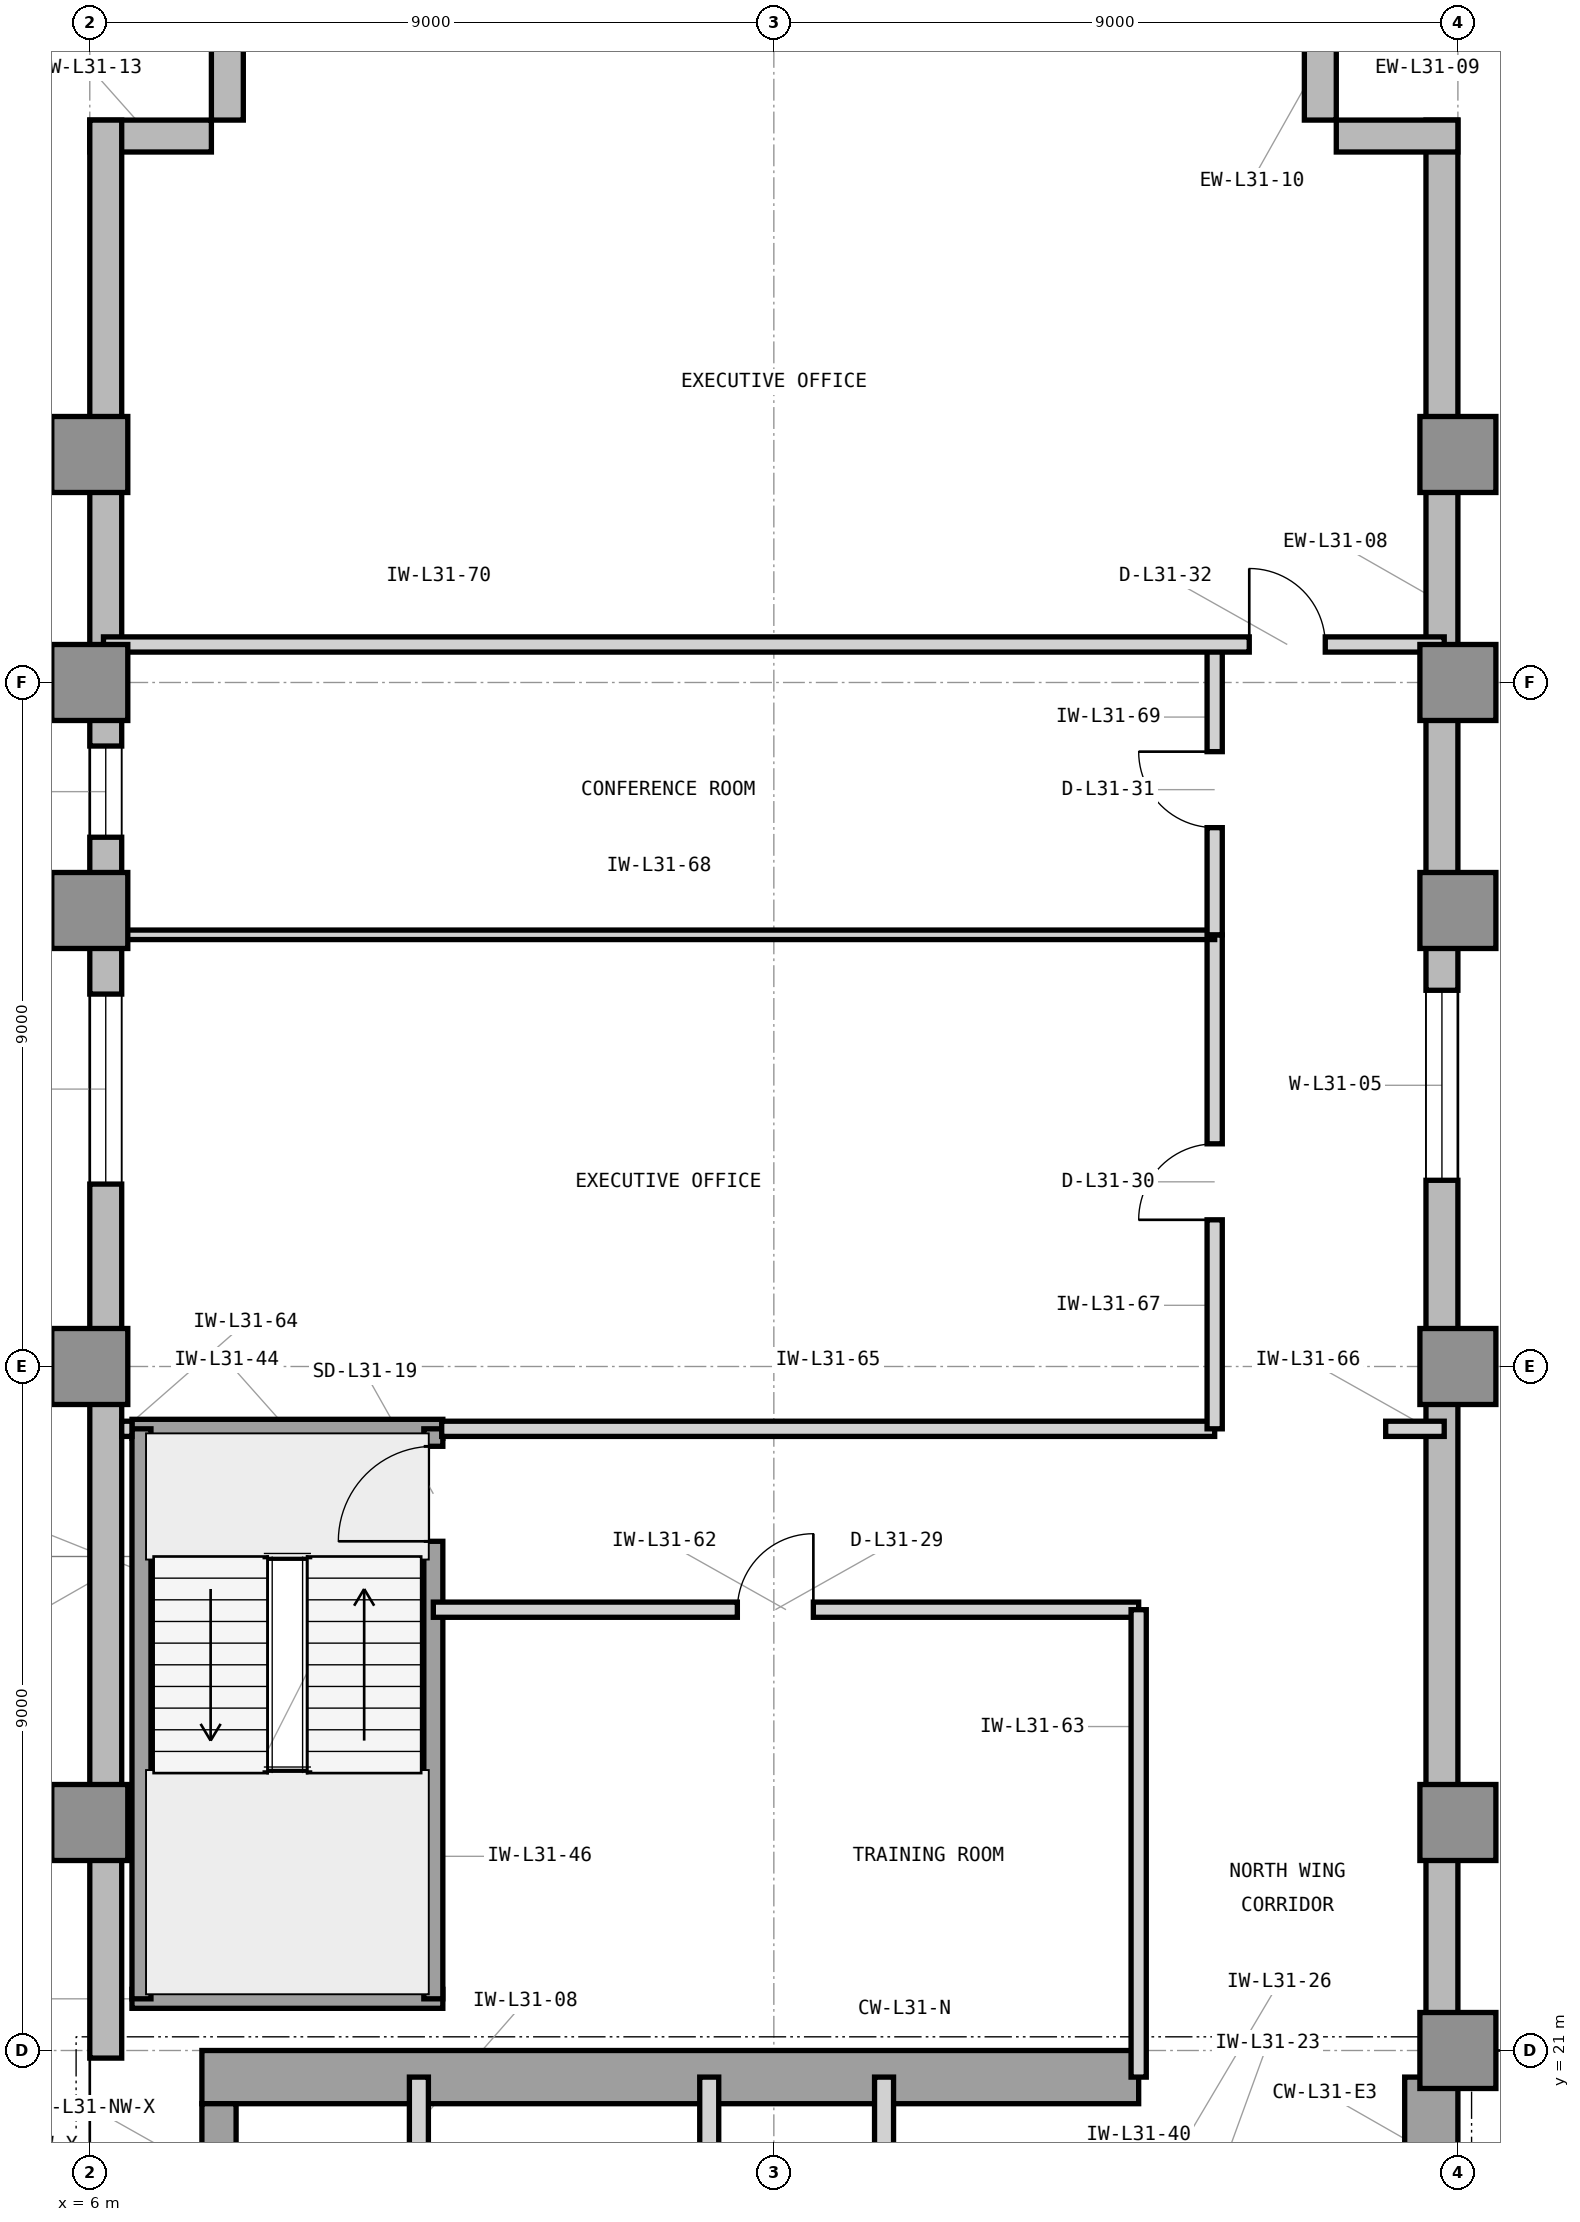
"""IFC4 building model, lengths in metres.
Left out: names, types, materials, properties, quantities, classifications, styles, units other than length and angle.
Written with IfcOpenShell. Run it as: python <this file> out.ifc"""

import sys

from ifc_helpers import new_model, si_unit, direction, frame, frame_2d, origin, origin_2d, place, context, subcontext, project, spatial, rectangle, extrude, element, fill, save


model = new_model("IFC4")
c1 = context("Model", 3, precision=1e-05, world=origin(), true_north=direction((0.0, 1.0)))
c2 = subcontext(c1, "Body", "Model", "MODEL_VIEW")
j1 = project(units=[si_unit("LENGTHUNIT", "METRE"), si_unit("PLANEANGLEUNIT", "RADIAN")], contexts=[c1])
p1 = place(None, origin())
s1 = spatial("IfcSite", under=j1, at=p1, CompositionType="ELEMENT")
p2 = place(p1, origin())
s2 = spatial("IfcBuilding", under=s1, at=p2, CompositionType="ELEMENT")
p3 = place(p2, frame((0.0, 0.0, 132.3)))
s3 = spatial("IfcBuildingStorey", under=s2, at=p3, CompositionType="ELEMENT", Elevation=132.3)
p4 = place(p3, frame((7.475, 20.65, 0.0), z_axis=(0.0, 0.0, 1.0), x_axis=(1.0, 0.0, 0.0)))
e1 = element("IfcWall", 1, at=p4, inside=s3, PredefinedType="SHEAR", context=c2, shape_type="SweptSolid", body=[
    extrude(rectangle(XDim=12.325, YDim=0.7, at=frame_2d((6.163, 0.0))), origin(), (0.0, 0.0, 1.0), 3.9),
])
p5 = place(p3, frame((23.65, 16.6, 0.0), z_axis=(0.0, 0.0, 1.0), x_axis=(0.0, 1.0, 0.0)))
e2 = element("IfcWall", 2, at=p5, inside=s3, PredefinedType="SHEAR", context=c2, shape_type="SweptSolid", body=[
    extrude(rectangle(XDim=4.05, YDim=0.7, at=frame_2d((2.025, 0.0))), origin(), (0.0, 0.0, 1.0), 3.9),
])
p6 = place(p3, frame((7.7, 19.575, 0.0), z_axis=(0.0, 0.0, 1.0), x_axis=(0.0, 1.0, 0.0)))
e3 = element("IfcWall", 3, at=p6, inside=s3, PredefinedType="SHEAR", context=c2, shape_type="SweptSolid", body=[
    extrude(rectangle(XDim=0.725, YDim=0.45, at=frame_2d((0.363, 0.0))), origin(), (0.0, 0.0, 1.0), 3.9),
])
for number, where, z_axis, x_axis in (
    (4, (24.0, 21.0, 0.0), (0.0, 0.0, 1.0), (1.0, 0.0, 0.0)),
    (5, (6.0, 24.0, 0.0), (0.0, 0.0, 1.0), (1.0, 0.0, 0.0)),
    (6, (24.0, 24.0, 0.0), (0.0, 0.0, 1.0), (1.0, 0.0, 0.0)),
    (7, (6.0, 30.0, 0.0), (0.0, 0.0, 1.0), (1.0, 0.0, 0.0)),
    (8, (24.0, 30.0, 0.0), (0.0, 0.0, 1.0), (1.0, 0.0, 0.0)),
    (9, (6.0, 36.0, 0.0), (0.0, 0.0, 1.0), (1.0, 0.0, 0.0)),
    (10, (24.0, 36.0, 0.0), (0.0, 0.0, 1.0), (1.0, 0.0, 0.0)),
    (11, (6.0, 39.0, 0.0), (0.0, 0.0, 1.0), (1.0, 0.0, 0.0)),
    (12, (24.0, 39.0, 0.0), (0.0, 0.0, 1.0), (1.0, 0.0, 0.0)),
    (13, (6.0, 42.0, 0.0), (0.0, 0.0, 1.0), (1.0, 0.0, 0.0)),
    (14, (24.0, 42.0, 0.0), (0.0, 0.0, 1.0), (1.0, 0.0, 0.0)),
):
    element("IfcColumn", number, at=place(p3, frame(where, z_axis=z_axis, x_axis=x_axis)), inside=s3, PredefinedType="COLUMN", context=c2, shape_type="SweptSolid", body=[
        extrude(rectangle(XDim=1.0, YDim=1.0, at=origin_2d()), origin(), (0.0, 0.0, 1.0), 3.9),
    ])
p7 = place(p3, frame((23.79, 21.0, 0.0), z_axis=(0.0, 0.0, 1.0), x_axis=(0.0, 1.0, 0.0)))
e15 = element("IfcWall", 15, at=p7, inside=s3, PredefinedType="STANDARD", context=c2, shape_type="SweptSolid", body=[
    extrude(rectangle(XDim=25.4, YDim=0.42, at=frame_2d((12.7, 0.0))), origin(), (0.0, 0.0, 1.0), 3.7),
])
p8 = place(p7, frame((11.45, 0.0, 0.85)))
e16 = element("IfcOpeningElement", 16, at=p8, cuts=e15, PredefinedType="OPENING", context=c2, shape_type="SweptSolid", body=[
    extrude(rectangle(XDim=2.5, YDim=2.25, at=frame_2d((1.25, 1.125))), frame((0.0, 0.22, 0.0), z_axis=(0.0, -1.0, 0.0), x_axis=(1.0, 0.0, 0.0)), (0.0, 0.0, 1.0), 0.44),
])
for number, where, z_axis, x_axis in (
    (17, (24.0, 46.19, 0.0), (0.0, 0.0, 1.0), (-1.0, 0.0, 0.0)),
    (18, (22.19, 46.4, 0.0), (0.0, 0.0, 1.0), (0.0, 1.0, 0.0)),
    (19, (7.81, 48.0, 0.0), (0.0, 0.0, 1.0), (0.0, -1.0, 0.0)),
    (20, (7.6, 46.19, 0.0), (0.0, 0.0, 1.0), (-1.0, 0.0, 0.0)),
):
    element("IfcWall", number, at=place(p3, frame(where, z_axis=z_axis, x_axis=x_axis)), inside=s3, PredefinedType="STANDARD", context=c2, shape_type="SweptSolid", body=[
        extrude(rectangle(XDim=1.6, YDim=0.42, at=frame_2d((0.8, 0.0))), origin(), (0.0, 0.0, 1.0), 3.7),
    ])
p9 = place(p3, frame((6.21, 46.4, 0.0), z_axis=(0.0, 0.0, 1.0), x_axis=(0.0, -1.0, 0.0)))
e21 = element("IfcWall", 21, at=p9, inside=s3, PredefinedType="STANDARD", context=c2, shape_type="SweptSolid", body=[
    extrude(rectangle(XDim=25.5, YDim=0.42, at=frame_2d((12.75, 0.0))), origin(), (0.0, 0.0, 1.0), 3.7),
])
p10 = place(p9, frame((11.5, 0.0, 0.85)))
e22 = element("IfcOpeningElement", 22, at=p10, cuts=e21, PredefinedType="OPENING", context=c2, shape_type="SweptSolid", body=[
    extrude(rectangle(XDim=2.5, YDim=2.25, at=frame_2d((1.25, 1.125))), frame((0.0, 0.22, 0.0), z_axis=(0.0, -1.0, 0.0), x_axis=(1.0, 0.0, 0.0)), (0.0, 0.0, 1.0), 0.44),
])
p11 = place(p9, frame((8.236, 0.0, 0.85)))
e23 = element("IfcOpeningElement", 23, at=p11, cuts=e21, PredefinedType="OPENING", context=c2, shape_type="SweptSolid", body=[
    extrude(rectangle(XDim=1.2, YDim=2.25, at=frame_2d((0.6, 1.125))), frame((0.0, 0.22, 0.0), z_axis=(0.0, -1.0, 0.0), x_axis=(1.0, 0.0, 0.0)), (0.0, 0.0, 1.0), 0.44),
])
p12 = place(p3, frame((10.33, 19.45, 0.0), z_axis=(0.0, 0.0, 1.0), x_axis=(0.0, 1.0, 0.0)))
e24 = element("IfcWall", 24, at=p12, inside=s3, PredefinedType="PARTITIONING", context=c2, shape_type="SweptSolid", body=[
    extrude(rectangle(XDim=1.2, YDim=0.25, at=frame_2d((0.6, 0.0))), origin(), (0.0, 0.0, 1.0), 2.994),
])
for number, where, z_axis, x_axis in (
    (25, (14.15, 16.7, 0.0), (0.0, 0.0, 1.0), (0.0, 1.0, 0.0)),
    (26, (16.45, 16.7, 0.0), (0.0, 0.0, 1.0), (0.0, 1.0, 0.0)),
):
    element("IfcWall", number, at=place(p3, frame(where, z_axis=z_axis, x_axis=x_axis)), inside=s3, PredefinedType="PARTITIONING", context=c2, shape_type="SweptSolid", body=[
        extrude(rectangle(XDim=3.95, YDim=0.25, at=frame_2d((1.975, 0.0))), origin(), (0.0, 0.0, 1.0), 3.69),
    ])
for number, where, z_axis, x_axis in (
    (27, (6.555, 21.68, 0.0), (0.0, 0.0, 1.0), (1.0, 0.0, 0.0)),
    (28, (6.555, 29.18, 0.0), (0.0, 0.0, 1.0), (1.0, 0.0, 0.0)),
):
    element("IfcWall", number, at=place(p3, frame(where, z_axis=z_axis, x_axis=x_axis)), inside=s3, PredefinedType="SHEAR", context=c2, shape_type="SweptSolid", body=[
        extrude(rectangle(XDim=4.09, YDim=0.25, at=frame_2d((2.045, 0.0))), origin(), (0.0, 0.0, 1.0), 3.9),
    ])
p13 = place(p3, frame((6.68, 21.68, 0.0), z_axis=(0.0, 0.0, 1.0), x_axis=(0.0, 1.0, 0.0)))
e29 = element("IfcWall", 29, at=p13, inside=s3, PredefinedType="SHEAR", context=c2, shape_type="SweptSolid", body=[
    extrude(rectangle(XDim=7.5, YDim=0.25, at=frame_2d((3.75, 0.0))), origin(), (0.0, 0.0, 1.0), 3.9),
])
p14 = place(p3, frame((10.52, 21.68, 0.0), z_axis=(0.0, 0.0, 1.0), x_axis=(0.0, 1.0, 0.0)))
e30 = element("IfcWall", 30, at=p14, inside=s3, PredefinedType="SHEAR", context=c2, shape_type="SweptSolid", body=[
    extrude(rectangle(XDim=7.5, YDim=0.25, at=frame_2d((3.75, 0.0))), origin(), (0.0, 0.0, 1.0), 3.9),
])
p15 = place(p14, frame((6.02, 0.0, 0.0)))
e31 = element("IfcOpeningElement", 31, at=p15, cuts=e30, PredefinedType="OPENING", context=c2, shape_type="SweptSolid", body=[
    extrude(rectangle(XDim=1.25, YDim=2.2, at=frame_2d((0.625, 1.1))), frame((0.0, 0.135, 0.0), z_axis=(0.0, -1.0, 0.0), x_axis=(1.0, 0.0, 0.0)), (0.0, 0.0, 1.0), 0.27),
])
p16 = place(p3, frame((10.52, 26.8, 0.0), z_axis=(0.0, 0.0, 1.0), x_axis=(1.0, 0.0, 0.0)))
e32 = element("IfcWall", 32, at=p16, inside=s3, PredefinedType="PARTITIONING", context=c2, shape_type="SweptSolid", body=[
    extrude(rectangle(XDim=9.28, YDim=0.2, at=frame_2d((4.64, 0.0))), origin(), (0.0, 0.0, 1.0), 3.69),
])
p17 = place(p16, frame((4.0, 0.0, 0.0)))
e33 = element("IfcOpeningElement", 33, at=p17, cuts=e32, PredefinedType="OPENING", context=c2, shape_type="SweptSolid", body=[
    extrude(rectangle(XDim=1.0, YDim=2.15, at=frame_2d((0.5, 1.075))), frame((0.0, 0.11, 0.0), z_axis=(0.0, -1.0, 0.0), x_axis=(1.0, 0.0, 0.0)), (0.0, 0.0, 1.0), 0.22),
])
p18 = place(p3, frame((19.8, 20.65, 0.0), z_axis=(0.0, 0.0, 1.0), x_axis=(0.0, 1.0, 0.0)))
e34 = element("IfcWall", 34, at=p18, inside=s3, PredefinedType="PARTITIONING", context=c2, shape_type="SweptSolid", body=[
    extrude(rectangle(XDim=6.15, YDim=0.2, at=frame_2d((3.075, 0.0))), origin(), (0.0, 0.0, 1.0), 3.69),
])
p19 = place(p3, frame((6.42, 29.18, 0.0), z_axis=(0.0, 0.0, 1.0), x_axis=(1.0, 0.0, 0.0)))
e35 = element("IfcWall", 35, at=p19, inside=s3, PredefinedType="PARTITIONING", context=c2, shape_type="SweptSolid", body=[
    extrude(rectangle(XDim=0.135, YDim=0.2, at=frame_2d((0.067, 0.0))), origin(), (0.0, 0.0, 1.0), 3.69),
])
p20 = place(p3, frame((10.63, 29.18, 0.0), z_axis=(0.0, 0.0, 1.0), x_axis=(1.0, 0.0, 0.0)))
e36 = element("IfcWall", 36, at=p20, inside=s3, PredefinedType="PARTITIONING", context=c2, shape_type="SweptSolid", body=[
    extrude(rectangle(XDim=10.17, YDim=0.2, at=frame_2d((5.085, 0.0))), origin(), (0.0, 0.0, 1.0), 3.69),
])
p21 = place(p3, frame((23.05, 29.18, 0.0), z_axis=(0.0, 0.0, 1.0), x_axis=(1.0, 0.0, 0.0)))
e37 = element("IfcWall", 37, at=p21, inside=s3, PredefinedType="PARTITIONING", context=c2, shape_type="SweptSolid", body=[
    extrude(rectangle(XDim=0.77, YDim=0.2, at=frame_2d((0.385, 0.0))), origin(), (0.0, 0.0, 1.0), 3.69),
])
p22 = place(p3, frame((20.8, 29.18, 0.0), z_axis=(0.0, 0.0, 1.0), x_axis=(0.0, 1.0, 0.0)))
e38 = element("IfcWall", 38, at=p22, inside=s3, PredefinedType="PARTITIONING", context=c2, shape_type="SweptSolid", body=[
    extrude(rectangle(XDim=6.5, YDim=0.2, at=frame_2d((3.25, 0.0))), origin(), (0.0, 0.0, 1.0), 3.69),
])
p23 = place(p22, frame((2.75, 0.0, 0.0)))
e39 = element("IfcOpeningElement", 39, at=p23, cuts=e38, PredefinedType="OPENING", context=c2, shape_type="SweptSolid", body=[
    extrude(rectangle(XDim=1.0, YDim=2.15, at=frame_2d((0.5, 1.075))), frame((0.0, 0.11, 0.0), z_axis=(0.0, -1.0, 0.0), x_axis=(1.0, 0.0, 0.0)), (0.0, 0.0, 1.0), 0.22),
])
p24 = place(p3, frame((6.18, 35.68, 0.0), z_axis=(0.0, 0.0, 1.0), x_axis=(1.0, 0.0, 0.0)))
e40 = element("IfcWall", 40, at=p24, inside=s3, PredefinedType="PARTITIONING", context=c2, shape_type="SweptSolid", body=[
    extrude(rectangle(XDim=14.62, YDim=0.125, at=frame_2d((7.31, 0.0))), origin(), (0.0, 0.0, 1.0), 3.69),
])
p25 = place(p3, frame((20.8, 35.68, 0.0), z_axis=(0.0, 0.0, 1.0), x_axis=(0.0, 1.0, 0.0)))
e41 = element("IfcWall", 41, at=p25, inside=s3, PredefinedType="PARTITIONING", context=c2, shape_type="SweptSolid", body=[
    extrude(rectangle(XDim=3.82, YDim=0.2, at=frame_2d((1.91, 0.0))), origin(), (0.0, 0.0, 1.0), 3.69),
])
p26 = place(p25, frame((1.41, 0.0, 0.0)))
e42 = element("IfcOpeningElement", 42, at=p26, cuts=e41, PredefinedType="OPENING", context=c2, shape_type="SweptSolid", body=[
    extrude(rectangle(XDim=1.0, YDim=2.15, at=frame_2d((0.5, 1.075))), frame((0.0, 0.11, 0.0), z_axis=(0.0, -1.0, 0.0), x_axis=(1.0, 0.0, 0.0)), (0.0, 0.0, 1.0), 0.22),
])
p27 = place(p3, frame((6.18, 39.5, 0.0), z_axis=(0.0, 0.0, 1.0), x_axis=(1.0, 0.0, 0.0)))
e43 = element("IfcWall", 43, at=p27, inside=s3, PredefinedType="PARTITIONING", context=c2, shape_type="SweptSolid", body=[
    extrude(rectangle(XDim=17.64, YDim=0.2, at=frame_2d((8.82, 0.0))), origin(), (0.0, 0.0, 1.0), 3.69),
])
p28 = place(p27, frame((15.075, 0.0, 0.0)))
e44 = element("IfcOpeningElement", 44, at=p28, cuts=e43, PredefinedType="OPENING", context=c2, shape_type="SweptSolid", body=[
    extrude(rectangle(XDim=1.0, YDim=2.15, at=frame_2d((0.5, 1.075))), frame((0.0, 0.11, 0.0), z_axis=(0.0, -1.0, 0.0), x_axis=(1.0, 0.0, 0.0)), (0.0, 0.0, 1.0), 0.22),
])
p29 = place(p8, origin())
e45 = element("IfcWindow", 45, at=p29, inside=s3, PartitioningType="SINGLE_PANEL", PredefinedType="WINDOW", context=c2, shape_type="SweptSolid", body=[
    extrude(rectangle(XDim=2.5, YDim=2.25, at=frame_2d((1.25, 1.125))), frame((0.0, 0.11, 0.0), z_axis=(0.0, -1.0, 0.0), x_axis=(1.0, 0.0, 0.0)), (0.0, 0.0, 1.0), 0.06),
])
fill(e16, e45)
p30 = place(p10, origin())
e46 = element("IfcWindow", 46, at=p30, inside=s3, PartitioningType="SINGLE_PANEL", PredefinedType="WINDOW", context=c2, shape_type="SweptSolid", body=[
    extrude(rectangle(XDim=2.5, YDim=2.25, at=frame_2d((1.25, 1.125))), frame((0.0, 0.11, 0.0), z_axis=(0.0, -1.0, 0.0), x_axis=(1.0, 0.0, 0.0)), (0.0, 0.0, 1.0), 0.06),
])
fill(e22, e46)
p31 = place(p15, origin())
e47 = element("IfcDoor", 47, at=p31, inside=s3, OperationType="SINGLE_SWING_LEFT", PredefinedType="DOOR", context=c2, shape_type="SweptSolid", body=[
    extrude(rectangle(XDim=1.25, YDim=2.2, at=frame_2d((0.625, 1.1))), frame((0.0, 0.025, 0.0), z_axis=(0.0, -1.0, 0.0), x_axis=(1.0, 0.0, 0.0)), (0.0, 0.0, 1.0), 0.05),
])
fill(e31, e47)
p32 = place(p17, origin())
e48 = element("IfcDoor", 48, at=p32, inside=s3, OperationType="SINGLE_SWING_RIGHT", PredefinedType="DOOR", context=c2, shape_type="SweptSolid", body=[
    extrude(rectangle(XDim=1.0, YDim=2.15, at=frame_2d((0.5, 1.075))), frame((0.0, 0.025, 0.0), z_axis=(0.0, -1.0, 0.0), x_axis=(1.0, 0.0, 0.0)), (0.0, 0.0, 1.0), 0.05),
])
fill(e33, e48)
p33 = place(p23, origin())
e49 = element("IfcDoor", 49, at=p33, inside=s3, OperationType="SINGLE_SWING_LEFT", PredefinedType="DOOR", context=c2, shape_type="SweptSolid", body=[
    extrude(rectangle(XDim=1.0, YDim=2.15, at=frame_2d((0.5, 1.075))), frame((0.0, 0.025, 0.0), z_axis=(0.0, -1.0, 0.0), x_axis=(1.0, 0.0, 0.0)), (0.0, 0.0, 1.0), 0.05),
])
fill(e39, e49)
p34 = place(p26, origin())
e50 = element("IfcDoor", 50, at=p34, inside=s3, OperationType="SINGLE_SWING_RIGHT", PredefinedType="DOOR", context=c2, shape_type="SweptSolid", body=[
    extrude(rectangle(XDim=1.0, YDim=2.15, at=frame_2d((0.5, 1.075))), frame((0.0, 0.025, 0.0), z_axis=(0.0, -1.0, 0.0), x_axis=(1.0, 0.0, 0.0)), (0.0, 0.0, 1.0), 0.05),
])
fill(e42, e50)
p35 = place(p28, origin())
e51 = element("IfcDoor", 51, at=p35, inside=s3, OperationType="SINGLE_SWING_LEFT", PredefinedType="DOOR", context=c2, shape_type="SweptSolid", body=[
    extrude(rectangle(XDim=1.0, YDim=2.15, at=frame_2d((0.5, 1.075))), frame((0.0, 0.025, 0.0), z_axis=(0.0, -1.0, 0.0), x_axis=(1.0, 0.0, 0.0)), (0.0, 0.0, 1.0), 0.05),
])
fill(e44, e51)
p36 = place(p11, origin())
e52 = element("IfcWindow", 52, at=p36, inside=s3, PartitioningType="SINGLE_PANEL", PredefinedType="WINDOW", context=c2, shape_type="SweptSolid", body=[
    extrude(rectangle(XDim=1.2, YDim=2.25, at=frame_2d((0.6, 1.125))), frame((0.0, 0.11, 0.0), z_axis=(0.0, -1.0, 0.0), x_axis=(1.0, 0.0, 0.0)), (0.0, 0.0, 1.0), 0.06),
])
fill(e23, e52)
save(model, sys.argv[1])
